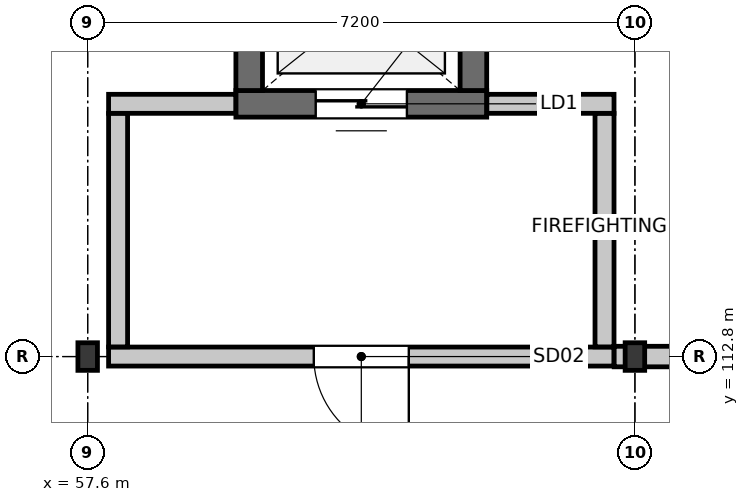
"""IFC4 building model, lengths in metres.
Left out: names, types, materials, properties, quantities, classifications, styles, units other than length and angle.
Written with IfcOpenShell. Run it as: python <this file> out.ifc"""

import sys

from ifc_helpers import new_model, si_unit, direction, frame, frame_2d, origin, origin_2d, place, context, subcontext, project, spatial, rectangle, i_section, extrude, element, fill, save


model = new_model("IFC4")
c1 = context("Model", 3, precision=1e-05, world=origin(), true_north=direction((0.0, 1.0)))
c2 = subcontext(c1, "Body", "Model", "MODEL_VIEW")
j1 = project(units=[si_unit("LENGTHUNIT", "METRE"), si_unit("PLANEANGLEUNIT", "RADIAN")], contexts=[c1])
p1 = place(None, origin())
s1 = spatial("IfcSite", under=j1, at=p1, CompositionType="ELEMENT")
p2 = place(p1, origin())
s2 = spatial("IfcBuilding", under=s1, at=p2, CompositionType="ELEMENT")
p3 = place(p2, frame((0.0, 0.0, 21.0)))
s3 = spatial("IfcBuildingStorey", under=s2, at=p3, CompositionType="ELEMENT", Elevation=21.0)
for number, where, z_axis, x_axis in (
    (1, (57.6, 112.8, 0.0), (0.0, 0.0, 1.0), (1.0, 0.0, 0.0)),
    (2, (64.8, 112.8, 0.0), (0.0, 0.0, 1.0), (1.0, 0.0, 0.0)),
):
    element("IfcColumn", number, at=place(p3, frame(where, z_axis=z_axis, x_axis=x_axis)), inside=s3, PredefinedType="COLUMN", context=c2, shape_type="SweptSolid", body=[
        extrude(i_section(OverallWidth=0.257, OverallDepth=0.363, WebThickness=0.013, FlangeThickness=0.022, FilletRadius=0.015, at=origin_2d()), origin(), (0.0, 0.0, 1.0), 3.3),
    ])
p4 = place(p3, frame((62.85, 116.125, 0.0), z_axis=(0.0, 0.0, 1.0), x_axis=(-1.0, 0.0, 0.0)))
e3 = element("IfcWall", 3, at=p4, inside=s3, PredefinedType="SHEAR", context=c2, shape_type="SweptSolid", body=[
    extrude(rectangle(XDim=3.3, YDim=0.35, at=frame_2d((1.65, 0.0))), origin(), (0.0, 0.0, 1.0), 2.6),
])
p5 = place(p4, frame((1.05, 0.0, 0.0)))
e4 = element("IfcOpeningElement", 4, at=p5, cuts=e3, PredefinedType="OPENING", context=c2, shape_type="SweptSolid", body=[
    extrude(rectangle(XDim=1.2, YDim=2.2, at=frame_2d((0.6, 1.1))), frame((0.0, 0.185, 0.0), z_axis=(0.0, -1.0, 0.0), x_axis=(1.0, 0.0, 0.0)), (0.0, 0.0, 1.0), 0.37),
])
for number, where, z_axis, x_axis in (
    (5, (59.725, 116.3, 0.0), (0.0, 0.0, 1.0), (0.0, 1.0, 0.0)),
    (6, (62.675, 118.5, 0.0), (0.0, 0.0, 1.0), (0.0, -1.0, 0.0)),
):
    element("IfcWall", number, at=place(p3, frame(where, z_axis=z_axis, x_axis=x_axis)), inside=s3, PredefinedType="SHEAR", context=c2, shape_type="SweptSolid", body=[
        extrude(rectangle(XDim=2.2, YDim=0.35, at=frame_2d((1.1, 0.0))), origin(), (0.0, 0.0, 1.0), 2.6),
    ])
p6 = place(p3, frame((64.525, 112.8, 0.0), z_axis=(0.0, 0.0, 1.0), x_axis=(-1.0, 0.0, 0.0)))
e7 = element("IfcWall", 7, at=p6, inside=s3, PredefinedType="PARTITIONING", context=c2, shape_type="SweptSolid", body=[
    extrude(rectangle(XDim=6.65, YDim=0.25, at=frame_2d((3.325, 0.0))), origin(), (0.0, 0.0, 1.0), 2.5),
])
p7 = place(p6, frame((2.7, 0.0, 0.0)))
e8 = element("IfcOpeningElement", 8, at=p7, cuts=e7, PredefinedType="OPENING", context=c2, shape_type="SweptSolid", body=[
    extrude(rectangle(XDim=1.25, YDim=2.2, at=frame_2d((0.625, 1.1))), frame((0.0, 0.135, 0.0), z_axis=(0.0, -1.0, 0.0), x_axis=(1.0, 0.0, 0.0)), (0.0, 0.0, 1.0), 0.27),
])
p8 = place(p3, frame((57.875, 116.125, 0.0), z_axis=(0.0, 0.0, 1.0), x_axis=(1.0, 0.0, 0.0)))
e9 = element("IfcWall", 9, at=p8, inside=s3, PredefinedType="PARTITIONING", context=c2, shape_type="SweptSolid", body=[
    extrude(rectangle(XDim=1.673, YDim=0.25, at=frame_2d((0.836, 0.0))), origin(), (0.0, 0.0, 1.0), 2.5),
])
p9 = place(p3, frame((62.852, 116.125, 0.0), z_axis=(0.0, 0.0, 1.0), x_axis=(1.0, 0.0, 0.0)))
e10 = element("IfcWall", 10, at=p9, inside=s3, PredefinedType="PARTITIONING", context=c2, shape_type="SweptSolid", body=[
    extrude(rectangle(XDim=1.673, YDim=0.25, at=frame_2d((0.836, 0.0))), origin(), (0.0, 0.0, 1.0), 2.5),
])
for number, where, z_axis, x_axis in (
    (11, (58.0, 112.927, 0.0), (0.0, 0.0, 1.0), (0.0, 1.0, 0.0)),
    (12, (64.4, 115.998, 0.0), (0.0, 0.0, 1.0), (0.0, -1.0, 0.0)),
):
    element("IfcWall", number, at=place(p3, frame(where, z_axis=z_axis, x_axis=x_axis)), inside=s3, PredefinedType="PARTITIONING", context=c2, shape_type="SweptSolid", body=[
        extrude(rectangle(XDim=3.071, YDim=0.25, at=frame_2d((1.536, 0.0))), origin(), (0.0, 0.0, 1.0), 2.5),
    ])
p10 = place(p3, frame((72.08, 112.8, 0.0), z_axis=(0.0, 0.0, 1.0), x_axis=(-1.0, 0.0, 0.0)))
e13 = element("IfcWall", 13, at=p10, inside=s3, PredefinedType="PARTITIONING", context=c2, shape_type="SweptSolid", body=[
    extrude(rectangle(XDim=7.553, YDim=0.27, at=frame_2d((3.776, 0.0))), origin(), (0.0, 0.0, 1.0), 2.5),
])
p11 = place(p10, frame((3.236, 0.0, 0.0)))
e14 = element("IfcOpeningElement", 14, at=p11, cuts=e13, PredefinedType="OPENING", context=c2, shape_type="SweptSolid", body=[
    extrude(rectangle(XDim=1.08, YDim=2.16, at=frame_2d((0.54, 1.08))), frame((0.0, 0.145, 0.0), z_axis=(0.0, -1.0, 0.0), x_axis=(1.0, 0.0, 0.0)), (0.0, 0.0, 1.0), 0.29),
])
p12 = place(p5, origin())
e15 = element("IfcDoor", 15, at=p12, inside=s3, OperationType="DOUBLE_DOOR_SLIDING", PredefinedType="DOOR", context=c2, shape_type="SweptSolid", body=[
    extrude(rectangle(XDim=1.2, YDim=2.2, at=frame_2d((0.6, 1.1))), frame((0.0, 0.025, 0.0), z_axis=(0.0, -1.0, 0.0), x_axis=(1.0, 0.0, 0.0)), (0.0, 0.0, 1.0), 0.05),
])
fill(e4, e15)
p13 = place(p7, origin())
e16 = element("IfcDoor", 16, at=p13, inside=s3, OperationType="SINGLE_SWING_LEFT", PredefinedType="DOOR", context=c2, shape_type="SweptSolid", body=[
    extrude(rectangle(XDim=1.25, YDim=2.2, at=frame_2d((0.625, 1.1))), frame((0.0, 0.025, 0.0), z_axis=(0.0, -1.0, 0.0), x_axis=(1.0, 0.0, 0.0)), (0.0, 0.0, 1.0), 0.05),
])
fill(e8, e16)
save(model, sys.argv[1])
